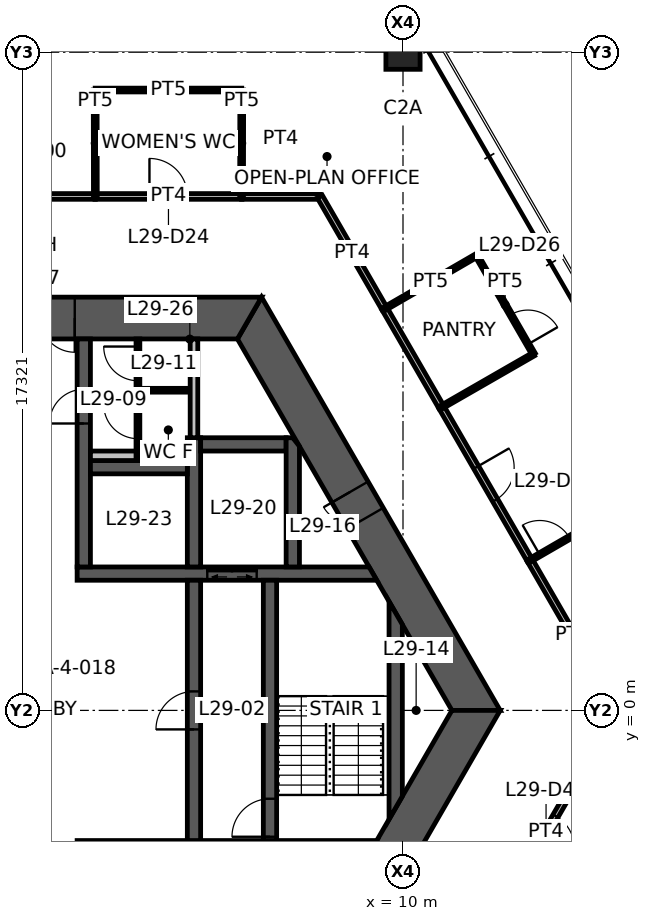
"""IFC4 building model, lengths in metres.
Left out: names, types, materials, properties, quantities, classifications, styles, units other than length and angle.
Written with IfcOpenShell. Run it as: python <this file> out.ifc"""

import sys

from ifc_helpers import new_model, si_unit, direction, frame, frame_2d, origin, origin_2d, place, context, subcontext, project, spatial, polyline, rectangle, hollow_rectangle, outline, extrude, element, fill, save


model = new_model("IFC4")
c1 = context("Model", 3, precision=1e-05, world=origin(), true_north=direction((0.0, 1.0)))
c2 = subcontext(c1, "Body", "Model", "MODEL_VIEW")
j1 = project(units=[si_unit("LENGTHUNIT", "METRE"), si_unit("PLANEANGLEUNIT", "RADIAN")], contexts=[c1])
p1 = place(None, origin())
s1 = spatial("IfcSite", under=j1, at=p1, CompositionType="ELEMENT")
p2 = place(p1, origin())
s2 = spatial("IfcBuilding", under=s1, at=p2, CompositionType="ELEMENT")
p3 = place(p2, frame((0.0, 0.0, 115.8)))
s3 = spatial("IfcBuildingStorey", under=s2, at=p3, CompositionType="ELEMENT", Elevation=115.8)
p4 = place(p3, frame((10.0, 17.321, 0.0), z_axis=(0.0, 0.0, 1.0), x_axis=(1.0, 0.0, 0.0)))
e1 = element("IfcColumn", 1, at=p4, inside=s3, PredefinedType="COLUMN", context=c2, shape_type="SweptSolid", body=[
    extrude(hollow_rectangle(XDim=0.9, YDim=0.9, WallThickness=0.055, at=origin_2d()), origin(), (0.0, 0.0, 1.0), 3.9),
])
p5 = place(p3, frame((11.922, 0.0, 0.0), z_axis=(0.0, 0.0, 1.0), x_axis=(-0.500004296715, 0.866022923061, 0.0)))
e2 = element("IfcWall", 2, at=p5, inside=s3, PredefinedType="SHEAR", context=c2, shape_type="SweptSolid", body=[
    extrude(outline(polyline([(-0.318, -0.55), (5.835, -0.55), (6.635, -0.55), (12.24, -0.55), (11.605, 0.55), (6.635, 0.55), (5.835, 0.55), (0.318, 0.55), (-0.318, -0.55)])), origin(), (0.0, 0.0, 1.0), 3.9),
])
p6 = place(p5, frame((5.835, 0.0, 0.0)))
e3 = element("IfcOpeningElement", 3, at=p6, cuts=e2, PredefinedType="OPENING", context=c2, shape_type="SweptSolid", body=[
    extrude(rectangle(XDim=0.8, YDim=2.1, at=frame_2d((0.4, 1.05))), frame((0.0, 0.56, 0.0), z_axis=(0.0, -1.0, 0.0), x_axis=(1.0, 0.0, 0.0)), (0.0, 0.0, 1.0), 1.12),
])
p7 = place(p3, frame((5.961, 10.325, 0.0), z_axis=(0.0, 0.0, 1.0), x_axis=(-1.0, 0.0, 0.0)))
e4 = element("IfcWall", 4, at=p7, inside=s3, PredefinedType="SHEAR", context=c2, shape_type="SweptSolid", body=[
    extrude(outline(polyline([(-0.318, -0.55), (4.599, -0.55), (5.499, -0.55), (6.424, -0.55), (7.323, -0.55), (12.24, -0.55), (11.605, 0.55), (7.323, 0.55), (6.424, 0.55), (5.499, 0.55), (4.599, 0.55), (0.318, 0.55), (-0.318, -0.55)])), origin(), (0.0, 0.0, 1.0), 3.9),
])
p8 = place(p7, frame((6.424, 0.0, 0.0)))
e5 = element("IfcOpeningElement", 5, at=p8, cuts=e4, PredefinedType="OPENING", context=c2, shape_type="SweptSolid", body=[
    extrude(rectangle(XDim=0.9, YDim=2.1, at=frame_2d((0.45, 1.05))), frame((0.0, 0.56, 0.0), z_axis=(0.0, -1.0, 0.0), x_axis=(1.0, 0.0, 0.0)), (0.0, 0.0, 1.0), 1.12),
])
p9 = place(p7, frame((4.599, 0.0, 0.0)))
e6 = element("IfcOpeningElement", 6, at=p9, cuts=e4, PredefinedType="OPENING", context=c2, shape_type="SweptSolid", body=[
    extrude(rectangle(XDim=0.9, YDim=2.1, at=frame_2d((0.45, 1.05))), frame((0.0, 0.56, 0.0), z_axis=(0.0, -1.0, 0.0), x_axis=(1.0, 0.0, 0.0)), (0.0, 0.0, 1.0), 1.12),
])
p10 = place(p3, frame((5.961, -10.325, 0.0), z_axis=(0.0, 0.0, 1.0), x_axis=(0.500004296715, 0.866022923061, 0.0)))
e7 = element("IfcWall", 7, at=p10, inside=s3, PredefinedType="SHEAR", context=c2, shape_type="SweptSolid", body=[
    extrude(outline(polyline([(-0.318, -0.55), (4.594, -0.55), (5.394, -0.55), (12.24, -0.55), (11.605, 0.55), (5.394, 0.55), (4.594, 0.55), (0.318, 0.55), (-0.318, -0.55)])), origin(), (0.0, 0.0, 1.0), 3.9),
])
p11 = place(p10, frame((4.594, 0.0, 0.0)))
e8 = element("IfcOpeningElement", 8, at=p11, cuts=e7, PredefinedType="OPENING", context=c2, shape_type="SweptSolid", body=[
    extrude(rectangle(XDim=0.8, YDim=2.1, at=frame_2d((0.4, 1.05))), frame((0.0, 0.56, 0.0), z_axis=(0.0, -1.0, 0.0), x_axis=(1.0, 0.0, 0.0)), (0.0, 0.0, 1.0), 1.12),
])
p12 = place(p3, frame((1.425, 3.6, 0.0), z_axis=(0.0, 0.0, 1.0), x_axis=(1.0, 0.0, 0.0)))
e9 = element("IfcWall", 9, at=p12, inside=s3, PredefinedType="SHEAR", context=c2, shape_type="SweptSolid", body=[
    extrude(outline(polyline([(0.0, -0.175), (3.425, -0.175), (4.725, -0.175), (7.885, -0.175), (7.683, 0.175), (4.725, 0.175), (3.425, 0.175), (0.0, 0.175), (0.0, -0.175)])), origin(), (0.0, 0.0, 1.0), 3.9),
])
p13 = place(p12, frame((3.425, 0.0, 0.0)))
e10 = element("IfcOpeningElement", 10, at=p13, cuts=e9, PredefinedType="OPENING", context=c2, shape_type="SweptSolid", body=[
    extrude(rectangle(XDim=1.3, YDim=2.1, at=frame_2d((0.65, 1.05))), frame((0.0, 0.185, 0.0), z_axis=(0.0, -1.0, 0.0), x_axis=(1.0, 0.0, 0.0)), (0.0, 0.0, 1.0), 0.37),
])
p14 = place(p3, frame((1.425, -3.6, 0.0), z_axis=(0.0, 0.0, 1.0), x_axis=(1.0, 0.0, 0.0)))
e11 = element("IfcWall", 11, at=p14, inside=s3, PredefinedType="SHEAR", context=c2, shape_type="SweptSolid", body=[
    extrude(outline(polyline([(0.0, -0.175), (1.075, -0.175), (2.175, -0.175), (7.683, -0.175), (7.885, 0.175), (2.175, 0.175), (1.075, 0.175), (0.0, 0.175), (0.0, -0.175)])), origin(), (0.0, 0.0, 1.0), 3.9),
])
p15 = place(p14, frame((1.075, 0.0, 0.0)))
e12 = element("IfcOpeningElement", 12, at=p15, cuts=e11, PredefinedType="OPENING", context=c2, shape_type="SweptSolid", body=[
    extrude(rectangle(XDim=1.1, YDim=2.1, at=frame_2d((0.55, 1.05))), frame((0.0, 0.185, 0.0), z_axis=(0.0, -1.0, 0.0), x_axis=(1.0, 0.0, 0.0)), (0.0, 0.0, 1.0), 0.37),
])
p16 = place(p3, frame((1.6, 3.775, 0.0), z_axis=(0.0, 0.0, 1.0), x_axis=(0.0, 1.0, 0.0)))
e13 = element("IfcWall", 13, at=p16, inside=s3, PredefinedType="SHEAR", context=c2, shape_type="SweptSolid", body=[
    extrude(rectangle(XDim=6.0, YDim=0.35, at=frame_2d((3.0, 0.0))), origin(), (0.0, 0.0, 1.0), 3.9),
])
p17 = place(p16, frame((3.775, 0.0, 0.0)))
e14 = element("IfcOpeningElement", 14, at=p17, cuts=e13, PredefinedType="OPENING", context=c2, shape_type="SweptSolid", body=[
    extrude(rectangle(XDim=0.9, YDim=2.1, at=frame_2d((0.45, 1.05))), frame((0.0, 0.185, 0.0), z_axis=(0.0, -1.0, 0.0), x_axis=(1.0, 0.0, 0.0)), (0.0, 0.0, 1.0), 0.37),
])
p18 = place(p3, frame((4.5, -3.425, 0.0), z_axis=(0.0, 0.0, 1.0), x_axis=(0.0, 1.0, 0.0)))
e15 = element("IfcWall", 15, at=p18, inside=s3, PredefinedType="SHEAR", context=c2, shape_type="SweptSolid", body=[
    extrude(rectangle(XDim=6.85, YDim=0.35, at=frame_2d((3.425, 0.0))), origin(), (0.0, 0.0, 1.0), 3.9),
])
p19 = place(p18, frame((2.925, 0.0, 0.0)))
e16 = element("IfcOpeningElement", 16, at=p19, cuts=e15, PredefinedType="OPENING", context=c2, shape_type="SweptSolid", body=[
    extrude(rectangle(XDim=1.0, YDim=2.1, at=frame_2d((0.5, 1.05))), frame((0.0, 0.185, 0.0), z_axis=(0.0, -1.0, 0.0), x_axis=(1.0, 0.0, 0.0)), (0.0, 0.0, 1.0), 0.37),
])
p20 = place(p3, frame((6.5, -3.425, 0.0), z_axis=(0.0, 0.0, 1.0), x_axis=(0.0, 1.0, 0.0)))
e17 = element("IfcWall", 17, at=p20, inside=s3, PredefinedType="SHEAR", context=c2, shape_type="SweptSolid", body=[
    extrude(rectangle(XDim=6.85, YDim=0.35, at=frame_2d((3.425, 0.0))), origin(), (0.0, 0.0, 1.0), 3.9),
])
p21 = place(p20, frame((0.1, 0.0, 0.0)))
e18 = element("IfcOpeningElement", 18, at=p21, cuts=e17, PredefinedType="OPENING", context=c2, shape_type="SweptSolid", body=[
    extrude(rectangle(XDim=1.0, YDim=2.1, at=frame_2d((0.5, 1.05))), frame((0.0, 0.185, 0.0), z_axis=(0.0, -1.0, 0.0), x_axis=(1.0, 0.0, 0.0)), (0.0, 0.0, 1.0), 0.37),
])
p22 = place(p3, frame((4.5, 3.775, 0.0), z_axis=(0.0, 0.0, 1.0), x_axis=(0.0, 1.0, 0.0)))
e19 = element("IfcWall", 19, at=p22, inside=s3, PredefinedType="SHEAR", context=c2, shape_type="SweptSolid", body=[
    extrude(rectangle(XDim=3.4, YDim=0.35, at=frame_2d((1.7, 0.0))), origin(), (0.0, 0.0, 1.0), 3.9),
])
p23 = place(p3, frame((1.775, 6.4, 0.0), z_axis=(0.0, 0.0, 1.0), x_axis=(1.0, 0.0, 0.0)))
e20 = element("IfcWall", 20, at=p23, inside=s3, PredefinedType="SHEAR", context=c2, shape_type="SweptSolid", body=[
    extrude(rectangle(XDim=2.55, YDim=0.35, at=frame_2d((1.275, 0.0))), origin(), (0.0, 0.0, 1.0), 3.9),
])
p24 = place(p3, frame((4.675, 7.0, 0.0), z_axis=(0.0, 0.0, 1.0), x_axis=(1.0, 0.0, 0.0)))
e21 = element("IfcWall", 21, at=p24, inside=s3, PredefinedType="SHEAR", context=c2, shape_type="SweptSolid", body=[
    extrude(rectangle(XDim=2.25, YDim=0.35, at=frame_2d((1.125, 0.0))), origin(), (0.0, 0.0, 1.0), 3.9),
])
p25 = place(p3, frame((7.1, 3.775, 0.0), z_axis=(0.0, 0.0, 1.0), x_axis=(0.0, 1.0, 0.0)))
e22 = element("IfcWall", 22, at=p25, inside=s3, PredefinedType="SHEAR", context=c2, shape_type="SweptSolid", body=[
    extrude(outline(polyline([(0.0, -0.175), (3.175, -0.175), (3.4, 0.0), (3.4, 0.175), (0.0, 0.175), (0.0, -0.175)])), origin(), (0.0, 0.0, 1.0), 3.9),
])
p26 = place(p3, frame((9.808, -2.562, 0.0), z_axis=(0.0, 0.0, 1.0), x_axis=(0.0, 1.0, 0.0)))
e23 = element("IfcWall", 23, at=p26, inside=s3, PredefinedType="SHEAR", context=c2, shape_type="SweptSolid", body=[
    extrude(outline(polyline([(0.303, -0.175), (4.821, -0.175), (5.428, 0.175), (-0.303, 0.175), (0.303, -0.175)])), origin(), (0.0, 0.0, 1.0), 3.9),
])
p27 = place(p3, frame((4.5, 7.175, 0.0), z_axis=(0.0, 0.0, 1.0), x_axis=(0.0, 1.0, 0.0)))
e24 = element("IfcWall", 24, at=p27, inside=s3, PredefinedType="STANDARD", context=c2, shape_type="SweptSolid", body=[
    extrude(rectangle(XDim=2.6, YDim=0.2, at=frame_2d((1.3, 0.0))), origin(), (0.0, 0.0, 1.0), 3.9),
])
p28 = place(p3, frame((1.775, 6.7, 0.0), z_axis=(0.0, 0.0, 1.0), x_axis=(1.0, 0.0, 0.0)))
e25 = element("IfcWall", 25, at=p28, inside=s3, PredefinedType="PLUMBINGWALL", context=c2, shape_type="SweptSolid", body=[
    extrude(rectangle(XDim=2.55, YDim=0.25, at=frame_2d((1.275, 0.0))), origin(), (0.0, 0.0, 1.0), 3.9),
])
p29 = place(p3, frame((3.025, 6.575, 0.0), z_axis=(0.0, 0.0, 1.0), x_axis=(0.0, 1.0, 0.0)))
e26 = element("IfcWall", 26, at=p29, inside=s3, PredefinedType="PARTITIONING", context=c2, shape_type="SweptSolid", body=[
    extrude(rectangle(XDim=3.2, YDim=0.1, at=frame_2d((1.6, 0.0))), origin(), (0.0, 0.0, 1.0), 2.95),
])
p30 = place(p29, frame((0.575, 0.0, 0.0)))
e27 = element("IfcOpeningElement", 27, at=p30, cuts=e26, PredefinedType="OPENING", context=c2, shape_type="SweptSolid", body=[
    extrude(rectangle(XDim=0.9, YDim=2.1, at=frame_2d((0.45, 1.05))), frame((0.0, 0.06, 0.0), z_axis=(0.0, -1.0, 0.0), x_axis=(1.0, 0.0, 0.0)), (0.0, 0.0, 1.0), 0.12),
])
p31 = place(p29, frame((2.1, 0.0, 0.0)))
e28 = element("IfcOpeningElement", 28, at=p31, cuts=e26, PredefinedType="OPENING", context=c2, shape_type="SweptSolid", body=[
    extrude(rectangle(XDim=0.9, YDim=2.1, at=frame_2d((0.45, 1.05))), frame((0.0, 0.06, 0.0), z_axis=(0.0, -1.0, 0.0), x_axis=(1.0, 0.0, 0.0)), (0.0, 0.0, 1.0), 0.12),
])
p32 = place(p3, frame((3.075, 8.425, 0.0), z_axis=(0.0, 0.0, 1.0), x_axis=(1.0, 0.0, 0.0)))
e29 = element("IfcWall", 29, at=p32, inside=s3, PredefinedType="PARTITIONING", context=c2, shape_type="SweptSolid", body=[
    extrude(rectangle(XDim=1.25, YDim=0.1, at=frame_2d((0.625, 0.0))), origin(), (0.0, 0.0, 1.0), 2.95),
])
p33 = place(p3, frame((1.895, 13.525, 0.0), z_axis=(0.0, 0.0, 1.0), x_axis=(1.0, 0.0, 0.0)))
e30 = element("IfcWall", 30, at=p33, inside=s3, PredefinedType="PARTITIONING", context=c2, shape_type="SweptSolid", body=[
    extrude(rectangle(XDim=3.867, YDim=0.15, at=frame_2d((1.934, 0.0))), origin(), (0.0, 0.0, 1.0), 2.95),
])
p34 = place(p33, frame((1.434, 0.0, 0.0)))
e31 = element("IfcOpeningElement", 31, at=p34, cuts=e30, PredefinedType="OPENING", context=c2, shape_type="SweptSolid", body=[
    extrude(rectangle(XDim=1.0, YDim=2.1, at=frame_2d((0.5, 1.05))), frame((0.0, 0.085, 0.0), z_axis=(0.0, -1.0, 0.0), x_axis=(1.0, 0.0, 0.0)), (0.0, 0.0, 1.0), 0.17),
])
p35 = place(p3, frame((9.51, 10.577, 0.0), z_axis=(0.0, 0.0, 1.0), x_axis=(0.499977562641, -0.866038357612, 0.0)))
e32 = element("IfcWall", 32, at=p35, inside=s3, PredefinedType="PARTITIONING", context=c2, shape_type="SweptSolid", body=[
    extrude(rectangle(XDim=3.01, YDim=0.15, at=frame_2d((1.505, 0.0))), origin(), (0.0, 0.0, 1.0), 2.95),
])
p36 = place(p3, frame((13.334, 3.955, 0.0), z_axis=(0.0, 0.0, 1.0), x_axis=(0.499987549055, -0.866032592222, 0.0)))
e33 = element("IfcWall", 33, at=p36, inside=s3, PredefinedType="PARTITIONING", context=c2, shape_type="SweptSolid", body=[
    extrude(rectangle(XDim=4.544, YDim=0.15, at=frame_2d((2.272, 0.0))), origin(), (0.0, 0.0, 1.0), 2.95),
])
p37 = place(p3, frame((0.42, 13.525, 0.0), z_axis=(0.0, 0.0, 1.0), x_axis=(1.0, 0.0, 0.0)))
e34 = element("IfcWall", 34, at=p37, inside=s3, PredefinedType="PARTITIONING", context=c2, shape_type="SweptSolid", body=[
    extrude(rectangle(XDim=1.485, YDim=0.15, at=frame_2d((0.742, 0.0))), origin(), (0.0, 0.0, 1.0), 2.95),
])
p38 = place(p3, frame((5.752, 13.525, 0.0), z_axis=(0.0, 0.0, 1.0), x_axis=(1.0, 0.0, 0.0)))
e35 = element("IfcWall", 35, at=p38, inside=s3, PredefinedType="PARTITIONING", context=c2, shape_type="SweptSolid", body=[
    extrude(rectangle(XDim=2.056, YDim=0.15, at=frame_2d((1.028, 0.0))), origin(), (0.0, 0.0, 1.0), 2.95),
])
p39 = place(p3, frame((7.809, 13.525, 0.0), z_axis=(0.0, 0.0, 1.0), x_axis=(0.500001088571, -0.866024775297, 0.0)))
e36 = element("IfcWall", 36, at=p39, inside=s3, PredefinedType="PARTITIONING", context=c2, shape_type="SweptSolid", body=[
    extrude(rectangle(XDim=3.413, YDim=0.15, at=frame_2d((1.707, 0.0))), origin(), (0.0, 0.0, 1.0), 2.95),
])
p40 = place(p3, frame((11.011, 7.979, 0.0), z_axis=(0.0, 0.0, 1.0), x_axis=(0.500008456887, -0.866020521143, 0.0)))
e37 = element("IfcWall", 37, at=p40, inside=s3, PredefinedType="PARTITIONING", context=c2, shape_type="SweptSolid", body=[
    extrude(rectangle(XDim=4.655, YDim=0.15, at=frame_2d((2.328, 0.0))), origin(), (0.0, 0.0, 1.0), 2.95),
])
p41 = place(p40, frame((1.828, 0.0, 0.0)))
e38 = element("IfcOpeningElement", 38, at=p41, cuts=e37, PredefinedType="OPENING", context=c2, shape_type="SweptSolid", body=[
    extrude(rectangle(XDim=1.0, YDim=2.1, at=frame_2d((0.5, 1.05))), frame((0.0, 0.085, 0.0), z_axis=(0.0, -1.0, 0.0), x_axis=(1.0, 0.0, 0.0)), (0.0, 0.0, 1.0), 0.17),
])
p42 = place(p3, frame((1.9, 16.325, 0.0), z_axis=(0.0, 0.0, 1.0), x_axis=(1.0, 0.0, 0.0)))
e39 = element("IfcWall", 39, at=p42, inside=s3, PredefinedType="PARTITIONING", context=c2, shape_type="SweptSolid", body=[
    extrude(rectangle(XDim=3.857, YDim=0.1, at=frame_2d((1.929, 0.0))), origin(), (0.0, 0.0, 1.0), 2.95),
])
for number, where, z_axis, x_axis in (
    (40, (1.905, 13.525, 0.0), (0.0, 0.0, 1.0), (-0.002, 1.0, 0.0)),
    (41, (5.757, 16.325, 0.0), (0.0, 0.0, 1.0), (-0.002, -1.0, 0.0)),
    (42, (9.515, 10.569, 0.0), (0.0, 0.0, 1.0), (0.865, 0.501, 0.0)),
):
    element("IfcWall", number, at=place(p3, frame(where, z_axis=z_axis, x_axis=x_axis)), inside=s3, PredefinedType="PARTITIONING", context=c2, shape_type="SweptSolid", body=[
        extrude(rectangle(XDim=2.8, YDim=0.1, at=frame_2d((1.4, 0.0))), origin(), (0.0, 0.0, 1.0), 2.95),
    ])
p43 = place(p3, frame((11.938, 11.973, 0.0), z_axis=(0.0, 0.0, 1.0), x_axis=(0.50002537861, -0.866010750942, 0.0)))
e43 = element("IfcWall", 43, at=p43, inside=s3, PredefinedType="PARTITIONING", context=c2, shape_type="SweptSolid", body=[
    extrude(rectangle(XDim=3.0, YDim=0.1, at=frame_2d((1.5, 0.0))), origin(), (0.0, 0.0, 1.0), 2.95),
])
p44 = place(p43, frame((1.8, 0.0, 0.0)))
e44 = element("IfcOpeningElement", 44, at=p44, cuts=e43, PredefinedType="OPENING", context=c2, shape_type="SweptSolid", body=[
    extrude(rectangle(XDim=0.9, YDim=2.1, at=frame_2d((0.45, 1.05))), frame((0.0, 0.06, 0.0), z_axis=(0.0, -1.0, 0.0), x_axis=(1.0, 0.0, 0.0)), (0.0, 0.0, 1.0), 0.12),
])
p45 = place(p3, frame((13.438, 9.375, 0.0), z_axis=(0.0, 0.0, 1.0), x_axis=(-0.866817750494, -0.498625097071, 0.0)))
e45 = element("IfcWall", 45, at=p45, inside=s3, PredefinedType="PARTITIONING", context=c2, shape_type="SweptSolid", body=[
    extrude(rectangle(XDim=2.8, YDim=0.1, at=frame_2d((1.4, 0.0))), origin(), (0.0, 0.0, 1.0), 2.95),
])
p46 = place(p3, frame((13.338, 3.947, 0.0), z_axis=(0.0, 0.0, 1.0), x_axis=(0.865505397626, 0.500899597405, 0.0)))
e46 = element("IfcWall", 46, at=p46, inside=s3, PredefinedType="PARTITIONING", context=c2, shape_type="SweptSolid", body=[
    extrude(rectangle(XDim=4.295, YDim=0.1, at=frame_2d((2.148, 0.0))), origin(), (0.0, 0.0, 1.0), 2.95),
])
p47 = place(p46, frame((0.3, 0.0, 0.0)))
e47 = element("IfcOpeningElement", 47, at=p47, cuts=e46, PredefinedType="OPENING", context=c2, shape_type="SweptSolid", body=[
    extrude(rectangle(XDim=0.9, YDim=2.1, at=frame_2d((0.45, 1.05))), frame((0.0, 0.06, 0.0), z_axis=(0.0, -1.0, 0.0), x_axis=(1.0, 0.0, 0.0)), (0.0, 0.0, 1.0), 0.12),
])
p48 = place(p3, frame((15.606, -0.02, 0.0), z_axis=(0.0, 0.0, 1.0), x_axis=(-0.499989298045, -0.866031582473, 0.0)))
e48 = element("IfcWall", 48, at=p48, inside=s3, PredefinedType="PARTITIONING", context=c2, shape_type="SweptSolid", body=[
    extrude(rectangle(XDim=7.365, YDim=0.15, at=frame_2d((3.683, 0.0))), origin(), (0.0, 0.0, 1.0), 2.95),
])
p49 = place(p48, frame((3.183, 0.0, 0.0)))
e49 = element("IfcOpeningElement", 49, at=p49, cuts=e48, PredefinedType="OPENING", context=c2, shape_type="SweptSolid", body=[
    extrude(rectangle(XDim=1.0, YDim=2.1, at=frame_2d((0.5, 1.05))), frame((0.0, 0.085, 0.0), z_axis=(0.0, -1.0, 0.0), x_axis=(1.0, 0.0, 0.0)), (0.0, 0.0, 1.0), 0.17),
])
p50 = place(p9, origin())
e50 = element("IfcDoor", 50, at=p50, inside=s3, OperationType="SINGLE_SWING_LEFT", PredefinedType="DOOR", context=c2, shape_type="SweptSolid", body=[
    extrude(rectangle(XDim=0.9, YDim=2.1, at=frame_2d((0.45, 1.05))), frame((0.0, 0.025, 0.0), z_axis=(0.0, -1.0, 0.0), x_axis=(1.0, 0.0, 0.0)), (0.0, 0.0, 1.0), 0.05),
])
fill(e6, e50)
p51 = place(p6, origin())
e51 = element("IfcDoor", 51, at=p51, inside=s3, OperationType="SINGLE_SWING_RIGHT", PredefinedType="DOOR", context=c2, shape_type="SweptSolid", body=[
    extrude(rectangle(XDim=0.8, YDim=2.1, at=frame_2d((0.4, 1.05))), frame((0.0, 0.025, 0.0), z_axis=(0.0, -1.0, 0.0), x_axis=(1.0, 0.0, 0.0)), (0.0, 0.0, 1.0), 0.05),
])
fill(e3, e51)
p52 = place(p19, origin())
e52 = element("IfcDoor", 52, at=p52, inside=s3, OperationType="SINGLE_SWING_LEFT", PredefinedType="DOOR", context=c2, shape_type="SweptSolid", body=[
    extrude(rectangle(XDim=1.0, YDim=2.1, at=frame_2d((0.5, 1.05))), frame((0.0, 0.025, 0.0), z_axis=(0.0, -1.0, 0.0), x_axis=(1.0, 0.0, 0.0)), (0.0, 0.0, 1.0), 0.05),
])
fill(e16, e52)
p53 = place(p21, origin())
e53 = element("IfcDoor", 53, at=p53, inside=s3, OperationType="SINGLE_SWING_LEFT", PredefinedType="DOOR", context=c2, shape_type="SweptSolid", body=[
    extrude(rectangle(XDim=1.0, YDim=2.1, at=frame_2d((0.5, 1.05))), frame((0.0, 0.025, 0.0), z_axis=(0.0, -1.0, 0.0), x_axis=(1.0, 0.0, 0.0)), (0.0, 0.0, 1.0), 0.05),
])
fill(e18, e53)
p54 = place(p17, origin())
e54 = element("IfcDoor", 54, at=p54, inside=s3, OperationType="SINGLE_SWING_LEFT", PredefinedType="DOOR", context=c2, shape_type="SweptSolid", body=[
    extrude(rectangle(XDim=0.9, YDim=2.1, at=frame_2d((0.45, 1.05))), frame((0.0, 0.025, 0.0), z_axis=(0.0, -1.0, 0.0), x_axis=(1.0, 0.0, 0.0)), (0.0, 0.0, 1.0), 0.05),
])
fill(e14, e54)
p55 = place(p30, origin())
e55 = element("IfcDoor", 55, at=p55, inside=s3, OperationType="SINGLE_SWING_RIGHT", PredefinedType="DOOR", context=c2, shape_type="SweptSolid", body=[
    extrude(rectangle(XDim=0.9, YDim=2.1, at=frame_2d((0.45, 1.05))), frame((0.0, 0.025, 0.0), z_axis=(0.0, -1.0, 0.0), x_axis=(1.0, 0.0, 0.0)), (0.0, 0.0, 1.0), 0.05),
])
fill(e27, e55)
p56 = place(p31, origin())
e56 = element("IfcDoor", 56, at=p56, inside=s3, OperationType="SINGLE_SWING_RIGHT", PredefinedType="DOOR", context=c2, shape_type="SweptSolid", body=[
    extrude(rectangle(XDim=0.9, YDim=2.1, at=frame_2d((0.45, 1.05))), frame((0.0, 0.025, 0.0), z_axis=(0.0, -1.0, 0.0), x_axis=(1.0, 0.0, 0.0)), (0.0, 0.0, 1.0), 0.05),
])
fill(e28, e56)
p57 = place(p34, origin())
e57 = element("IfcDoor", 57, at=p57, inside=s3, OperationType="SINGLE_SWING_LEFT", PredefinedType="DOOR", context=c2, shape_type="SweptSolid", body=[
    extrude(rectangle(XDim=1.0, YDim=2.1, at=frame_2d((0.5, 1.05))), frame((0.0, 0.025, 0.0), z_axis=(0.0, -1.0, 0.0), x_axis=(1.0, 0.0, 0.0)), (0.0, 0.0, 1.0), 0.05),
])
fill(e31, e57)
p58 = place(p41, origin())
e58 = element("IfcDoor", 58, at=p58, inside=s3, OperationType="SINGLE_SWING_LEFT", PredefinedType="DOOR", context=c2, shape_type="SweptSolid", body=[
    extrude(rectangle(XDim=1.0, YDim=2.1, at=frame_2d((0.5, 1.05))), frame((0.0, 0.025, 0.0), z_axis=(0.0, -1.0, 0.0), x_axis=(1.0, 0.0, 0.0)), (0.0, 0.0, 1.0), 0.05),
])
fill(e38, e58)
p59 = place(p44, origin())
e59 = element("IfcDoor", 59, at=p59, inside=s3, OperationType="SINGLE_SWING_RIGHT", PredefinedType="DOOR", context=c2, shape_type="SweptSolid", body=[
    extrude(rectangle(XDim=0.9, YDim=2.1, at=frame_2d((0.45, 1.05))), frame((0.0, 0.025, 0.0), z_axis=(0.0, -1.0, 0.0), x_axis=(1.0, 0.0, 0.0)), (0.0, 0.0, 1.0), 0.05),
])
fill(e44, e59)
p60 = place(p47, origin())
e60 = element("IfcDoor", 60, at=p60, inside=s3, OperationType="SINGLE_SWING_LEFT", PredefinedType="DOOR", context=c2, shape_type="SweptSolid", body=[
    extrude(rectangle(XDim=0.9, YDim=2.1, at=frame_2d((0.45, 1.05))), frame((0.0, 0.025, 0.0), z_axis=(0.0, -1.0, 0.0), x_axis=(1.0, 0.0, 0.0)), (0.0, 0.0, 1.0), 0.05),
])
fill(e47, e60)
p61 = place(p49, origin())
e61 = element("IfcDoor", 61, at=p61, inside=s3, OperationType="SINGLE_SWING_RIGHT", PredefinedType="DOOR", context=c2, shape_type="SweptSolid", body=[
    extrude(rectangle(XDim=1.0, YDim=2.1, at=frame_2d((0.5, 1.05))), frame((0.0, 0.025, 0.0), z_axis=(0.0, -1.0, 0.0), x_axis=(1.0, 0.0, 0.0)), (0.0, 0.0, 1.0), 0.05),
])
fill(e49, e61)
p62 = place(p13, origin())
e62 = element("IfcDoor", 62, at=p62, inside=s3, OperationType="DOUBLE_DOOR_SLIDING", PredefinedType="DOOR", context=c2, shape_type="SweptSolid", body=[
    extrude(rectangle(XDim=1.3, YDim=2.1, at=frame_2d((0.65, 1.05))), frame((0.0, 0.025, 0.0), z_axis=(0.0, -1.0, 0.0), x_axis=(1.0, 0.0, 0.0)), (0.0, 0.0, 1.0), 0.05),
])
fill(e10, e62)
save(model, sys.argv[1])
